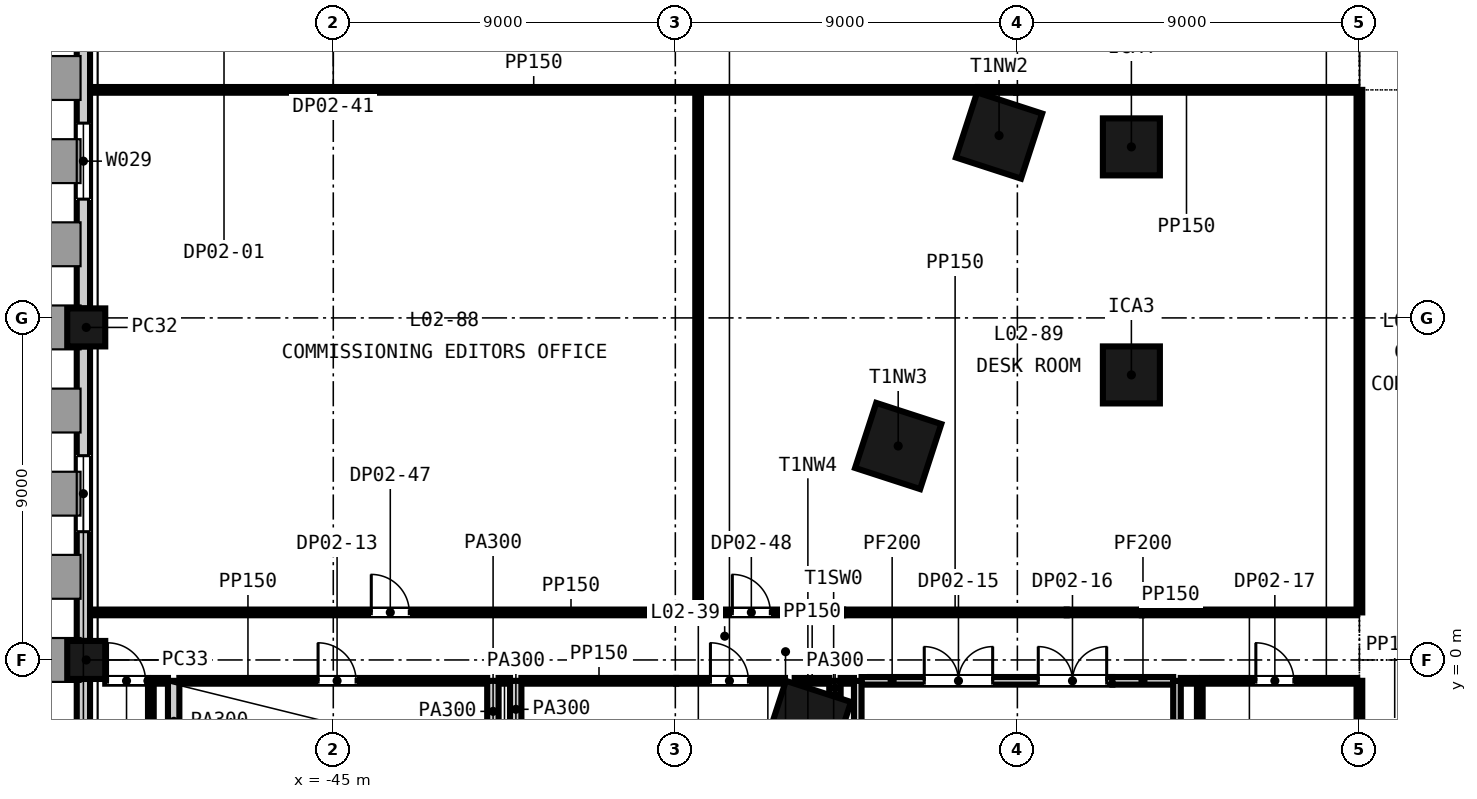
"""IFC4 building model, lengths in metres.
Left out: names, types, materials, properties, quantities, classifications, styles, units other than length and angle.
Written with IfcOpenShell. Run it as: python <this file> out.ifc"""

import sys

from ifc_helpers import new_model, si_unit, direction, frame, frame_2d, origin, origin_2d, place, context, subcontext, project, spatial, rectangle, extrude, element, fill, save


model = new_model("IFC4")
c1 = context("Model", 3, precision=1e-05, world=origin(), true_north=direction((0.0, 1.0)))
c2 = subcontext(c1, "Body", "Model", "MODEL_VIEW")
j1 = project(units=[si_unit("LENGTHUNIT", "METRE"), si_unit("PLANEANGLEUNIT", "RADIAN")], contexts=[c1])
p1 = place(None, origin())
s1 = spatial("IfcSite", under=j1, at=p1, CompositionType="ELEMENT")
p2 = place(p1, origin())
s2 = spatial("IfcBuilding", under=s1, at=p2, CompositionType="ELEMENT")
p3 = place(p2, frame((0.0, 0.0, 18.0)))
s3 = spatial("IfcBuildingStorey", under=s2, at=p3, CompositionType="ELEMENT", Elevation=18.0)
for number, where, z_axis, x_axis in (
    (1, (-27.482, 13.799, -0.4), (0.0, 0.0, 1.0), (-0.309, -0.951, 0.0)),
    (2, (-30.136, 5.63, -0.4), (0.0, 0.0, 1.0), (-0.309, -0.951, 0.0)),
    (3, (-32.512, -1.683, -0.4), (0.0, 0.0, 1.0), (-0.309, -0.951, 0.0)),
):
    element("IfcColumn", number, at=place(p3, frame(where, z_axis=z_axis, x_axis=x_axis)), inside=s3, PredefinedType="COLUMN", context=c2, shape_type="SweptSolid", body=[
        extrude(rectangle(XDim=1.8, YDim=1.8, at=origin_2d()), origin(), (0.0, 0.0, 1.0), 4.6),
    ])
for number, where, z_axis, x_axis in (
    (4, (-24.0, 7.5, -0.4), (0.0, 0.0, 1.0), (1.0, 0.0, 0.0)),
    (5, (-24.0, 13.5, -0.4), (0.0, 0.0, 1.0), (1.0, 0.0, 0.0)),
):
    element("IfcColumn", number, at=place(p3, frame(where, z_axis=z_axis, x_axis=x_axis)), inside=s3, PredefinedType="COLUMN", context=c2, shape_type="SweptSolid", body=[
        extrude(rectangle(XDim=1.5, YDim=1.5, at=origin_2d()), origin(), (0.0, 0.0, 1.0), 4.6),
    ])
for number, where, z_axis, x_axis in (
    (6, (-51.5, 8.75, -0.4), (0.0, 0.0, 1.0), (0.0, -1.0, 0.0)),
    (7, (-51.5, 0.0, -0.4), (0.0, 0.0, 1.0), (0.0, -1.0, 0.0)),
):
    element("IfcColumn", number, at=place(p3, frame(where, z_axis=z_axis, x_axis=x_axis)), inside=s3, PredefinedType="COLUMN", context=c2, shape_type="SweptSolid", body=[
        extrude(rectangle(XDim=1.0, YDim=1.0, at=origin_2d()), origin(), (0.0, 0.0, 1.0), 4.6),
    ])
p4 = place(p3, frame((-51.575, 17.0, -0.4), z_axis=(0.0, 0.0, 1.0), x_axis=(0.0, -1.0, 0.0)))
e8 = element("IfcWall", 8, at=p4, inside=s3, PredefinedType="SOLIDWALL", context=c2, shape_type="SweptSolid", body=[
    extrude(rectangle(XDim=7.75, YDim=0.35, at=frame_2d((3.875, 0.0))), origin(), (0.0, 0.0, 1.0), 3.7),
])
p5 = place(p4, frame((2.875, 0.0, 1.3)))
e9 = element("IfcOpeningElement", 9, at=p5, cuts=e8, PredefinedType="OPENING", context=c2, shape_type="SweptSolid", body=[
    extrude(rectangle(XDim=2.0, YDim=2.35, at=frame_2d((1.0, 1.175))), frame((0.0, 0.185, 0.0), z_axis=(0.0, -1.0, 0.0), x_axis=(1.0, 0.0, 0.0)), (0.0, 0.0, 1.0), 0.37),
])
p6 = place(p3, frame((-51.575, 8.25, -0.4), z_axis=(0.0, 0.0, 1.0), x_axis=(0.0, -1.0, 0.0)))
e10 = element("IfcWall", 10, at=p6, inside=s3, PredefinedType="SOLIDWALL", context=c2, shape_type="SweptSolid", body=[
    extrude(rectangle(XDim=7.75, YDim=0.35, at=frame_2d((3.875, 0.0))), origin(), (0.0, 0.0, 1.0), 3.7),
])
p7 = place(p6, frame((2.875, 0.0, 1.3)))
e11 = element("IfcOpeningElement", 11, at=p7, cuts=e10, PredefinedType="OPENING", context=c2, shape_type="SweptSolid", body=[
    extrude(rectangle(XDim=2.0, YDim=2.35, at=frame_2d((1.0, 1.175))), frame((0.0, 0.185, 0.0), z_axis=(0.0, -1.0, 0.0), x_axis=(1.0, 0.0, 0.0)), (0.0, 0.0, 1.0), 0.37),
])
p8 = place(p3, frame((-51.575, -0.5, -0.4), z_axis=(0.0, 0.0, 1.0), x_axis=(0.0, -1.0, 0.0)))
e12 = element("IfcWall", 12, at=p8, inside=s3, PredefinedType="SOLIDWALL", context=c2, shape_type="SweptSolid", body=[
    extrude(rectangle(XDim=7.7, YDim=0.35, at=frame_2d((3.85, 0.0))), origin(), (0.0, 0.0, 1.0), 3.7),
])
p9 = place(p8, frame((2.85, 0.0, 1.3)))
e13 = element("IfcOpeningElement", 13, at=p9, cuts=e12, PredefinedType="OPENING", context=c2, shape_type="SweptSolid", body=[
    extrude(rectangle(XDim=2.0, YDim=2.35, at=frame_2d((1.0, 1.175))), frame((0.0, 0.185, 0.0), z_axis=(0.0, -1.0, 0.0), x_axis=(1.0, 0.0, 0.0)), (0.0, 0.0, 1.0), 0.37),
])
p10 = place(p3, frame((-51.0, -0.549, 0.0), z_axis=(0.0, 0.0, 1.0), x_axis=(1.0, 0.0, 0.0)))
e14 = element("IfcWall", 14, at=p10, inside=s3, PredefinedType="PARTITIONING", context=c2, shape_type="SweptSolid", body=[
    extrude(rectangle(XDim=1.125, YDim=0.15, at=frame_2d((0.562, 0.0))), origin(), (0.0, 0.0, 1.0), 4.2),
])
p11 = place(p10, frame((0.06, 0.0, 0.0)))
e15 = element("IfcOpeningElement", 15, at=p11, cuts=e14, PredefinedType="OPENING", context=c2, shape_type="SweptSolid", body=[
    extrude(rectangle(XDim=1.0, YDim=2.1, at=frame_2d((0.5, 1.05))), frame((0.0, 0.085, 0.0), z_axis=(0.0, -1.0, 0.0), x_axis=(1.0, 0.0, 0.0)), (0.0, 0.0, 1.0), 0.17),
])
p12 = place(p3, frame((-49.725, -0.549, 0.0), z_axis=(0.0, 0.0, 1.0), x_axis=(1.0, 0.0, 0.0)))
e16 = element("IfcWall", 16, at=p12, inside=s3, PredefinedType="PARTITIONING", context=c2, shape_type="SweptSolid", body=[
    extrude(rectangle(XDim=0.375, YDim=0.15, at=frame_2d((0.188, 0.0))), origin(), (0.0, 0.0, 1.0), 4.2),
])
p13 = place(p3, frame((-49.05, -0.549, 0.0), z_axis=(0.0, 0.0, 1.0), x_axis=(1.0, 0.0, 0.0)))
e17 = element("IfcWall", 17, at=p13, inside=s3, PredefinedType="PARTITIONING", context=c2, shape_type="SweptSolid", body=[
    extrude(rectangle(XDim=8.1, YDim=0.15, at=frame_2d((4.05, 0.0))), origin(), (0.0, 0.0, 1.0), 4.2),
])
p14 = place(p13, frame((3.65, 0.0, 0.0)))
e18 = element("IfcOpeningElement", 18, at=p14, cuts=e17, PredefinedType="OPENING", context=c2, shape_type="SweptSolid", body=[
    extrude(rectangle(XDim=1.0, YDim=2.1, at=frame_2d((0.5, 1.05))), frame((0.0, 0.085, 0.0), z_axis=(0.0, -1.0, 0.0), x_axis=(1.0, 0.0, 0.0)), (0.0, 0.0, 1.0), 0.17),
])
p15 = place(p3, frame((-40.65, -0.549, 0.0), z_axis=(0.0, 0.0, 1.0), x_axis=(1.0, 0.0, 0.0)))
e19 = element("IfcWall", 19, at=p15, inside=s3, PredefinedType="PARTITIONING", context=c2, shape_type="SweptSolid", body=[
    extrude(rectangle(XDim=0.3, YDim=0.15, at=frame_2d((0.15, 0.0))), origin(), (0.0, 0.0, 1.0), 4.2),
])
p16 = place(p3, frame((-40.05, -0.549, 0.0), z_axis=(0.0, 0.0, 1.0), x_axis=(1.0, 0.0, 0.0)))
e20 = element("IfcWall", 20, at=p16, inside=s3, PredefinedType="PARTITIONING", context=c2, shape_type="SweptSolid", body=[
    extrude(rectangle(XDim=4.074, YDim=0.15, at=frame_2d((2.037, 0.0))), origin(), (0.0, 0.0, 1.0), 4.2),
])
p17 = place(p3, frame((-35.976, -0.549, 0.0), z_axis=(0.0, 0.0, 1.0), x_axis=(1.0, 0.0, 0.0)))
e21 = element("IfcWall", 21, at=p17, inside=s3, PredefinedType="PARTITIONING", context=c2, shape_type="SweptSolid", body=[
    extrude(rectangle(XDim=2.862, YDim=0.15, at=frame_2d((1.431, 0.0))), origin(), (0.0, 0.0, 1.0), 3.298),
])
p18 = place(p17, frame((0.9, 0.0, 0.0)))
e22 = element("IfcOpeningElement", 22, at=p18, cuts=e21, PredefinedType="OPENING", context=c2, shape_type="SweptSolid", body=[
    extrude(rectangle(XDim=1.0, YDim=2.1, at=frame_2d((0.5, 1.05))), frame((0.0, 0.085, 0.0), z_axis=(0.0, -1.0, 0.0), x_axis=(1.0, 0.0, 0.0)), (0.0, 0.0, 1.0), 0.17),
])
p19 = place(p3, frame((-32.859, -0.549, 0.0), z_axis=(0.0, 0.0, 1.0), x_axis=(1.0, 0.0, 0.0)))
e23 = element("IfcWall", 23, at=p19, inside=s3, PredefinedType="PARTITIONING", context=c2, shape_type="SweptSolid", body=[
    extrude(rectangle(XDim=0.909, YDim=0.15, at=frame_2d((0.455, 0.0))), origin(), (0.0, 0.0, 1.0), 3.2),
])
p20 = place(p3, frame((-31.65, -0.549, 0.0), z_axis=(0.0, 0.0, 1.0), x_axis=(1.0, 0.0, 0.0)))
e24 = element("IfcWall", 24, at=p20, inside=s3, PredefinedType="PARTITIONING", context=c2, shape_type="SweptSolid", body=[
    extrude(rectangle(XDim=0.35, YDim=0.15, at=frame_2d((0.175, 0.0))), origin(), (0.0, 0.0, 1.0), 4.2),
])
p21 = place(p3, frame((-31.1, -0.549, 0.0), z_axis=(0.0, 0.0, 1.0), x_axis=(1.0, 0.0, 0.0)))
e25 = element("IfcWall", 25, at=p21, inside=s3, PredefinedType="PARTITIONING", context=c2, shape_type="SweptSolid", body=[
    extrude(rectangle(XDim=6.6, YDim=0.2, at=frame_2d((3.3, 0.0))), origin(), (0.0, 0.0, 1.0), 4.2),
])
p22 = place(p21, frame((1.65, 0.0, 0.0)))
e26 = element("IfcOpeningElement", 26, at=p22, cuts=e25, PredefinedType="OPENING", context=c2, shape_type="SweptSolid", body=[
    extrude(rectangle(XDim=1.8, YDim=2.4, at=frame_2d((0.9, 1.2))), frame((0.0, 0.11, 0.0), z_axis=(0.0, -1.0, 0.0), x_axis=(1.0, 0.0, 0.0)), (0.0, 0.0, 1.0), 0.22),
])
p23 = place(p21, frame((4.65, 0.0, 0.0)))
e27 = element("IfcOpeningElement", 27, at=p23, cuts=e25, PredefinedType="OPENING", context=c2, shape_type="SweptSolid", body=[
    extrude(rectangle(XDim=1.8, YDim=2.4, at=frame_2d((0.9, 1.2))), frame((0.0, 0.11, 0.0), z_axis=(0.0, -1.0, 0.0), x_axis=(1.0, 0.0, 0.0)), (0.0, 0.0, 1.0), 0.22),
])
p24 = place(p3, frame((-24.5, -0.549, 0.0), z_axis=(0.0, 0.0, 1.0), x_axis=(1.0, 0.0, 0.0)))
e28 = element("IfcWall", 28, at=p24, inside=s3, PredefinedType="PARTITIONING", context=c2, shape_type="SweptSolid", body=[
    extrude(rectangle(XDim=1.6, YDim=0.2, at=frame_2d((0.8, 0.0))), origin(), (0.0, 0.0, 1.0), 3.111),
])
p25 = place(p3, frame((-22.7, -0.549, 0.0), z_axis=(0.0, 0.0, 1.0), x_axis=(1.0, 0.0, 0.0)))
e29 = element("IfcWall", 29, at=p25, inside=s3, PredefinedType="PARTITIONING", context=c2, shape_type="SweptSolid", body=[
    extrude(rectangle(XDim=0.425, YDim=0.15, at=frame_2d((0.212, 0.0))), origin(), (0.0, 0.0, 1.0), 4.2),
])
p26 = place(p3, frame((-22.125, -0.549, 0.0), z_axis=(0.0, 0.0, 1.0), x_axis=(1.0, 0.0, 0.0)))
e30 = element("IfcWall", 30, at=p26, inside=s3, PredefinedType="PARTITIONING", context=c2, shape_type="SweptSolid", body=[
    extrude(rectangle(XDim=4.05, YDim=0.15, at=frame_2d((2.025, 0.0))), origin(), (0.0, 0.0, 1.0), 4.2),
])
p27 = place(p26, frame((1.4, 0.0, 0.0)))
e31 = element("IfcOpeningElement", 31, at=p27, cuts=e30, PredefinedType="OPENING", context=c2, shape_type="SweptSolid", body=[
    extrude(rectangle(XDim=1.0, YDim=2.1, at=frame_2d((0.5, 1.05))), frame((0.0, 0.085, 0.0), z_axis=(0.0, -1.0, 0.0), x_axis=(1.0, 0.0, 0.0)), (0.0, 0.0, 1.0), 0.17),
])
p28 = place(p3, frame((-51.4, 1.251, 0.0), z_axis=(0.0, 0.0, 1.0), x_axis=(1.0, 0.0, 0.0)))
e32 = element("IfcWall", 32, at=p28, inside=s3, PredefinedType="PARTITIONING", context=c2, shape_type="SweptSolid", body=[
    extrude(rectangle(XDim=18.815, YDim=0.15, at=frame_2d((9.408, 0.0))), origin(), (0.0, 0.0, 1.0), 4.2),
])
p29 = place(p28, frame((7.4, 0.0, 0.0)))
e33 = element("IfcOpeningElement", 33, at=p29, cuts=e32, PredefinedType="OPENING", context=c2, shape_type="SweptSolid", body=[
    extrude(rectangle(XDim=1.0, YDim=2.1, at=frame_2d((0.5, 1.05))), frame((0.0, 0.085, 0.0), z_axis=(0.0, -1.0, 0.0), x_axis=(1.0, 0.0, 0.0)), (0.0, 0.0, 1.0), 0.17),
])
p30 = place(p28, frame((16.9, 0.0, 0.0)))
e34 = element("IfcOpeningElement", 34, at=p30, cuts=e32, PredefinedType="OPENING", context=c2, shape_type="SweptSolid", body=[
    extrude(rectangle(XDim=1.0, YDim=2.1, at=frame_2d((0.5, 1.05))), frame((0.0, 0.085, 0.0), z_axis=(0.0, -1.0, 0.0), x_axis=(1.0, 0.0, 0.0)), (0.0, 0.0, 1.0), 0.17),
])
p31 = place(p3, frame((-32.584, 1.251, 0.0), z_axis=(0.0, 0.0, 1.0), x_axis=(1.0, 0.0, 0.0)))
e35 = element("IfcWall", 35, at=p31, inside=s3, PredefinedType="PARTITIONING", context=c2, shape_type="SweptSolid", body=[
    extrude(rectangle(XDim=1.0, YDim=0.15, at=frame_2d((0.5, 0.0))), origin(), (0.0, 0.0, 1.0), 3.2),
])
p32 = place(p3, frame((-31.584, 1.251, 0.0), z_axis=(0.0, 0.0, 1.0), x_axis=(1.0, 0.0, 0.0)))
e36 = element("IfcWall", 36, at=p32, inside=s3, PredefinedType="PARTITIONING", context=c2, shape_type="SweptSolid", body=[
    extrude(rectangle(XDim=5.883, YDim=0.15, at=frame_2d((2.941, 0.0))), origin(), (0.0, 0.0, 1.0), 4.2),
])
p33 = place(p3, frame((-25.702, 1.251, 0.0), z_axis=(0.0, 0.0, 1.0), x_axis=(1.0, 0.0, 0.0)))
e37 = element("IfcWall", 37, at=p33, inside=s3, PredefinedType="PARTITIONING", context=c2, shape_type="SweptSolid", body=[
    extrude(rectangle(XDim=1.977, YDim=0.15, at=frame_2d((0.988, 0.0))), origin(), (0.0, 0.0, 1.0), 3.111),
])
p34 = place(p3, frame((-23.725, 1.251, 0.0), z_axis=(0.0, 0.0, 1.0), x_axis=(1.0, 0.0, 0.0)))
e38 = element("IfcWall", 38, at=p34, inside=s3, PredefinedType="PARTITIONING", context=c2, shape_type="SweptSolid", body=[
    extrude(rectangle(XDim=5.65, YDim=0.15, at=frame_2d((2.825, 0.0))), origin(), (0.0, 0.0, 1.0), 4.2),
])
p35 = place(p3, frame((-51.4, 15.0, 0.0), z_axis=(0.0, 0.0, 1.0), x_axis=(1.0, 0.0, 0.0)))
e39 = element("IfcWall", 39, at=p35, inside=s3, PredefinedType="PARTITIONING", context=c2, shape_type="SweptSolid", body=[
    extrude(rectangle(XDim=23.338, YDim=0.15, at=frame_2d((11.669, 0.0))), origin(), (0.0, 0.0, 1.0), 4.2),
])
p36 = place(p3, frame((-28.035, 15.0, 0.0), z_axis=(0.0, 0.0, 1.0), x_axis=(1.0, 0.0, 0.0)))
e40 = element("IfcWall", 40, at=p36, inside=s3, PredefinedType="PARTITIONING", context=c2, shape_type="SweptSolid", body=[
    extrude(rectangle(XDim=1.0, YDim=0.15, at=frame_2d((0.5, 0.0))), origin(), (0.0, 0.0, 1.0), 3.2),
])
p37 = place(p3, frame((-27.035, 15.0, 0.0), z_axis=(0.0, 0.0, 1.0), x_axis=(1.0, 0.0, 0.0)))
e41 = element("IfcWall", 41, at=p37, inside=s3, PredefinedType="PARTITIONING", context=c2, shape_type="SweptSolid", body=[
    extrude(rectangle(XDim=8.96, YDim=0.15, at=frame_2d((4.48, 0.0))), origin(), (0.0, 0.0, 1.0), 4.2),
])
p38 = place(p3, frame((-49.8, -9.8, 0.0), z_axis=(0.0, 0.0, 1.0), x_axis=(0.0, 1.0, 0.0)))
e42 = element("IfcWall", 42, at=p38, inside=s3, PredefinedType="PARTITIONING", context=c2, shape_type="SweptSolid", body=[
    extrude(rectangle(XDim=9.25, YDim=0.15, at=frame_2d((4.625, 0.0))), origin(), (0.0, 0.0, 1.0), 4.2),
])
p39 = place(p3, frame((-49.2, -2.68, 0.0), z_axis=(0.0, 0.0, 1.0), x_axis=(0.0, 1.0, 0.0)))
e43 = element("IfcWall", 43, at=p39, inside=s3, PredefinedType="PARTITIONING", context=c2, shape_type="SweptSolid", body=[
    extrude(rectangle(XDim=2.13, YDim=0.3, at=frame_2d((1.065, 0.0))), origin(), (0.0, 0.0, 1.0), 4.2),
])
p40 = place(p3, frame((-40.8, -2.156, 0.0), z_axis=(0.0, 0.0, 1.0), x_axis=(0.0, 1.0, 0.0)))
e44 = element("IfcWall", 44, at=p40, inside=s3, PredefinedType="PARTITIONING", context=c2, shape_type="SweptSolid", body=[
    extrude(rectangle(XDim=1.606, YDim=0.3, at=frame_2d((0.803, 0.0))), origin(), (0.0, 0.0, 1.0), 3.298),
])
p41 = place(p3, frame((-40.2, -2.047, 0.0), z_axis=(0.0, 0.0, 1.0), x_axis=(0.0, 1.0, 0.0)))
e45 = element("IfcWall", 45, at=p41, inside=s3, PredefinedType="PARTITIONING", context=c2, shape_type="SweptSolid", body=[
    extrude(rectangle(XDim=1.497, YDim=0.3, at=frame_2d((0.749, 0.0))), origin(), (0.0, 0.0, 1.0), 3.298),
])
p42 = place(p3, frame((-35.4, 1.326, 0.0), z_axis=(0.0, 0.0, 1.0), x_axis=(0.0, 1.0, 0.0)))
e46 = element("IfcWall", 46, at=p42, inside=s3, PredefinedType="PARTITIONING", context=c2, shape_type="SweptSolid", body=[
    extrude(rectangle(XDim=13.599, YDim=0.15, at=frame_2d((6.8, 0.0))), origin(), (0.0, 0.0, 1.0), 4.2),
])
p43 = place(p3, frame((-31.8, -0.919, 0.0), z_axis=(0.0, 0.0, 1.0), x_axis=(0.0, 1.0, 0.0)))
e47 = element("IfcWall", 47, at=p43, inside=s3, PredefinedType="PARTITIONING", context=c2, shape_type="SweptSolid", body=[
    extrude(rectangle(XDim=0.369, YDim=0.3, at=frame_2d((0.185, 0.0))), origin(), (0.0, 0.0, 1.0), 4.2),
])
p44 = place(p3, frame((-31.2, -6.187, 0.0), z_axis=(0.0, 0.0, 1.0), x_axis=(0.0, 1.0, 0.0)))
e48 = element("IfcWall", 48, at=p44, inside=s3, PredefinedType="PARTITIONING", context=c2, shape_type="SweptSolid", body=[
    extrude(rectangle(XDim=5.637, YDim=0.2, at=frame_2d((2.818, 0.0))), origin(), (0.0, 0.0, 1.0), 4.2),
])
p45 = place(p3, frame((-22.8, -6.925, 0.0), z_axis=(0.0, 0.0, 1.0), x_axis=(0.0, 1.0, 0.0)))
e49 = element("IfcWall", 49, at=p45, inside=s3, PredefinedType="PARTITIONING", context=c2, shape_type="SweptSolid", body=[
    extrude(rectangle(XDim=6.375, YDim=0.2, at=frame_2d((3.188, 0.0))), origin(), (0.0, 0.0, 1.0), 4.2),
])
p46 = place(p3, frame((-22.2, -6.567, 0.0), z_axis=(0.0, 0.0, 1.0), x_axis=(0.0, 1.0, 0.0)))
e50 = element("IfcWall", 50, at=p46, inside=s3, PredefinedType="PARTITIONING", context=c2, shape_type="SweptSolid", body=[
    extrude(rectangle(XDim=6.017, YDim=0.15, at=frame_2d((3.009, 0.0))), origin(), (0.0, 0.0, 1.0), 4.2),
])
p47 = place(p3, frame((-18.0, -3.2, 0.0), z_axis=(0.0, 0.0, 1.0), x_axis=(0.0, 1.0, 0.0)))
e51 = element("IfcWall", 51, at=p47, inside=s3, PredefinedType="PARTITIONING", context=c2, shape_type="SweptSolid", body=[
    extrude(rectangle(XDim=2.651, YDim=0.15, at=frame_2d((1.326, 0.0))), origin(), (0.0, 0.0, 1.0), 4.2),
])
p48 = place(p3, frame((-18.0, 1.251, 0.0), z_axis=(0.0, 0.0, 1.0), x_axis=(0.0, 1.0, 0.0)))
e52 = element("IfcWall", 52, at=p48, inside=s3, PredefinedType="PARTITIONING", context=c2, shape_type="SweptSolid", body=[
    extrude(rectangle(XDim=13.749, YDim=0.15, at=frame_2d((6.875, 0.0))), origin(), (0.0, 0.0, 1.0), 4.2),
])
p49 = place(p5, origin())
e53 = element("IfcWindow", 53, at=p49, inside=s3, PartitioningType="SINGLE_PANEL", PredefinedType="WINDOW", context=c2, shape_type="SweptSolid", body=[
    extrude(rectangle(XDim=2.0, YDim=2.35, at=frame_2d((1.0, 1.175))), frame((0.0, 0.03, 0.0), z_axis=(0.0, -1.0, 0.0), x_axis=(1.0, 0.0, 0.0)), (0.0, 0.0, 1.0), 0.06),
])
fill(e9, e53)
p50 = place(p7, origin())
e54 = element("IfcWindow", 54, at=p50, inside=s3, PartitioningType="SINGLE_PANEL", PredefinedType="WINDOW", context=c2, shape_type="SweptSolid", body=[
    extrude(rectangle(XDim=2.0, YDim=2.35, at=frame_2d((1.0, 1.175))), frame((0.0, 0.03, 0.0), z_axis=(0.0, -1.0, 0.0), x_axis=(1.0, 0.0, 0.0)), (0.0, 0.0, 1.0), 0.06),
])
fill(e11, e54)
p51 = place(p11, origin())
e55 = element("IfcDoor", 55, at=p51, inside=s3, OperationType="SINGLE_SWING_LEFT", PredefinedType="DOOR", context=c2, shape_type="SweptSolid", body=[
    extrude(rectangle(XDim=1.0, YDim=2.1, at=frame_2d((0.5, 1.05))), frame((0.0, 0.025, 0.0), z_axis=(0.0, -1.0, 0.0), x_axis=(1.0, 0.0, 0.0)), (0.0, 0.0, 1.0), 0.05),
])
fill(e15, e55)
p52 = place(p14, origin())
e56 = element("IfcDoor", 56, at=p52, inside=s3, OperationType="SINGLE_SWING_LEFT", PredefinedType="DOOR", context=c2, shape_type="SweptSolid", body=[
    extrude(rectangle(XDim=1.0, YDim=2.1, at=frame_2d((0.5, 1.05))), frame((0.0, 0.025, 0.0), z_axis=(0.0, -1.0, 0.0), x_axis=(1.0, 0.0, 0.0)), (0.0, 0.0, 1.0), 0.05),
])
fill(e18, e56)
p53 = place(p18, origin())
e57 = element("IfcDoor", 57, at=p53, inside=s3, OperationType="SINGLE_SWING_LEFT", PredefinedType="DOOR", context=c2, shape_type="SweptSolid", body=[
    extrude(rectangle(XDim=1.0, YDim=2.1, at=frame_2d((0.5, 1.05))), frame((0.0, 0.025, 0.0), z_axis=(0.0, -1.0, 0.0), x_axis=(1.0, 0.0, 0.0)), (0.0, 0.0, 1.0), 0.05),
])
fill(e22, e57)
p54 = place(p22, origin())
e58 = element("IfcDoor", 58, at=p54, inside=s3, OperationType="SINGLE_SWING_LEFT", PredefinedType="DOOR", context=c2, shape_type="SweptSolid", body=[
    extrude(rectangle(XDim=1.8, YDim=2.4, at=frame_2d((0.9, 1.2))), frame((0.0, 0.025, 0.0), z_axis=(0.0, -1.0, 0.0), x_axis=(1.0, 0.0, 0.0)), (0.0, 0.0, 1.0), 0.05),
])
fill(e26, e58)
p55 = place(p23, origin())
e59 = element("IfcDoor", 59, at=p55, inside=s3, OperationType="SINGLE_SWING_LEFT", PredefinedType="DOOR", context=c2, shape_type="SweptSolid", body=[
    extrude(rectangle(XDim=1.8, YDim=2.4, at=frame_2d((0.9, 1.2))), frame((0.0, 0.025, 0.0), z_axis=(0.0, -1.0, 0.0), x_axis=(1.0, 0.0, 0.0)), (0.0, 0.0, 1.0), 0.05),
])
fill(e27, e59)
p56 = place(p27, origin())
e60 = element("IfcDoor", 60, at=p56, inside=s3, OperationType="SINGLE_SWING_LEFT", PredefinedType="DOOR", context=c2, shape_type="SweptSolid", body=[
    extrude(rectangle(XDim=1.0, YDim=2.1, at=frame_2d((0.5, 1.05))), frame((0.0, 0.025, 0.0), z_axis=(0.0, -1.0, 0.0), x_axis=(1.0, 0.0, 0.0)), (0.0, 0.0, 1.0), 0.05),
])
fill(e31, e60)
p57 = place(p29, origin())
e61 = element("IfcDoor", 61, at=p57, inside=s3, OperationType="SINGLE_SWING_LEFT", PredefinedType="DOOR", context=c2, shape_type="SweptSolid", body=[
    extrude(rectangle(XDim=1.0, YDim=2.1, at=frame_2d((0.5, 1.05))), frame((0.0, 0.025, 0.0), z_axis=(0.0, -1.0, 0.0), x_axis=(1.0, 0.0, 0.0)), (0.0, 0.0, 1.0), 0.05),
])
fill(e33, e61)
p58 = place(p30, origin())
e62 = element("IfcDoor", 62, at=p58, inside=s3, OperationType="SINGLE_SWING_LEFT", PredefinedType="DOOR", context=c2, shape_type="SweptSolid", body=[
    extrude(rectangle(XDim=1.0, YDim=2.1, at=frame_2d((0.5, 1.05))), frame((0.0, 0.025, 0.0), z_axis=(0.0, -1.0, 0.0), x_axis=(1.0, 0.0, 0.0)), (0.0, 0.0, 1.0), 0.05),
])
fill(e34, e62)
save(model, sys.argv[1])
